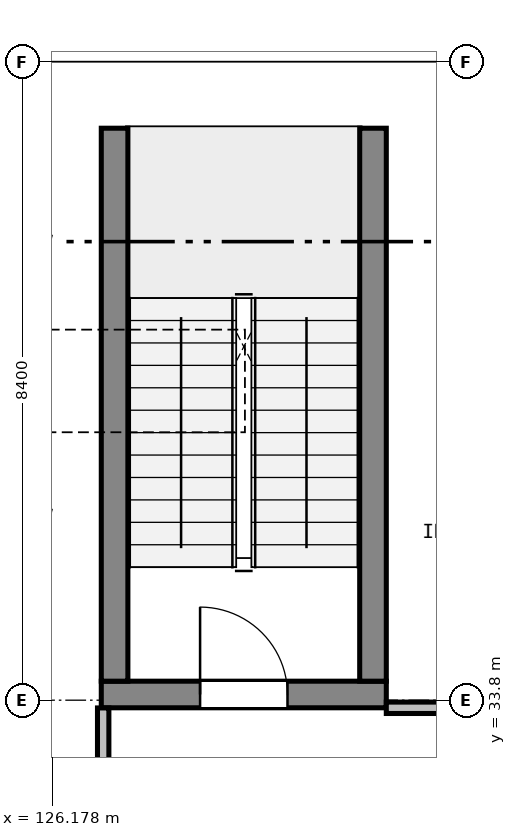
"""IFC4 building model, lengths in metres.
Left out: names, types, materials, properties, quantities, classifications, styles, units other than length and angle.
Written with IfcOpenShell. Run it as: python <this file> out.ifc"""

import sys

from ifc_helpers import new_model, si_unit, direction, frame, frame_2d, origin, place, context, subcontext, project, spatial, rectangle, extrude, element, fill, save


model = new_model("IFC4")
c1 = context("Model", 3, precision=1e-05, world=origin(), true_north=direction((0.0, 1.0)))
c2 = subcontext(c1, "Body", "Model", "MODEL_VIEW")
j1 = project(units=[si_unit("LENGTHUNIT", "METRE"), si_unit("PLANEANGLEUNIT", "RADIAN")], contexts=[c1])
p1 = place(None, origin())
s1 = spatial("IfcSite", under=j1, at=p1, CompositionType="ELEMENT")
p2 = place(p1, origin())
s2 = spatial("IfcBuilding", under=s1, at=p2, CompositionType="ELEMENT")
p3 = place(p2, frame((0.0, 0.0, 15.0)))
s3 = spatial("IfcBuildingStorey", under=s2, at=p3, CompositionType="ELEMENT", Elevation=15.0)
p4 = place(p3, frame((126.825, 33.875, 0.0), z_axis=(0.0, 0.0, 1.0), x_axis=(1.0, 0.0, 0.0)))
e1 = element("IfcWall", 1, at=p4, inside=s3, PredefinedType="SHEAR", context=c2, shape_type="SweptSolid", body=[
    extrude(rectangle(XDim=3.75, YDim=0.35, at=frame_2d((1.875, 0.0))), origin(), (0.0, 0.0, 1.0), 4.5),
])
p5 = place(p4, frame((1.3, 0.0, 0.0)))
e2 = element("IfcOpeningElement", 2, at=p5, cuts=e1, PredefinedType="OPENING", context=c2, shape_type="SweptSolid", body=[
    extrude(rectangle(XDim=1.15, YDim=2.15, at=frame_2d((0.575, 1.075))), frame((0.0, 0.185, 0.0), z_axis=(0.0, -1.0, 0.0), x_axis=(1.0, 0.0, 0.0)), (0.0, 0.0, 1.0), 0.37),
])
p6 = place(p3, frame((126.825, 41.5, 0.0), z_axis=(0.0, 0.0, 1.0), x_axis=(1.0, 0.0, 0.0)))
e3 = element("IfcWall", 3, at=p6, inside=s3, PredefinedType="SHEAR", context=c2, shape_type="SweptSolid", body=[
    extrude(rectangle(XDim=3.75, YDim=0.35, at=frame_2d((1.875, 0.0))), origin(), (0.0, 0.0, 1.0), 4.5),
])
for number, where, z_axis, x_axis in (
    (4, (127.0, 34.05, 0.0), (0.0, 0.0, 1.0), (0.0, 1.0, 0.0)),
    (5, (130.4, 34.05, 0.0), (0.0, 0.0, 1.0), (0.0, 1.0, 0.0)),
):
    element("IfcWall", number, at=place(p3, frame(where, z_axis=z_axis, x_axis=x_axis)), inside=s3, PredefinedType="SHEAR", context=c2, shape_type="SweptSolid", body=[
        extrude(rectangle(XDim=7.275, YDim=0.35, at=frame_2d((3.637, 0.0))), origin(), (0.0, 0.0, 1.0), 4.5),
    ])
p7 = place(p3, frame((130.575, 33.7, 0.0), z_axis=(0.0, 0.0, 1.0), x_axis=(1.0, 0.0, 0.0)))
e6 = element("IfcWall", 6, at=p7, inside=s3, PredefinedType="PARTITIONING", context=c2, shape_type="SweptSolid", body=[
    extrude(rectangle(XDim=1.3, YDim=0.15, at=frame_2d((0.65, 0.0))), origin(), (0.0, 0.0, 1.0), 3.835),
])
p8 = place(p3, frame((126.85, 30.1, 0.0), z_axis=(0.0, 0.0, 1.0), x_axis=(0.0, 1.0, 0.0)))
e7 = element("IfcWall", 7, at=p8, inside=s3, PredefinedType="PARTITIONING", context=c2, shape_type="SweptSolid", body=[
    extrude(rectangle(XDim=3.598, YDim=0.15, at=frame_2d((1.799, 0.0))), origin(), (0.0, 0.0, 1.0), 3.835),
])
p9 = place(p5, origin())
e8 = element("IfcDoor", 8, at=p9, inside=s3, OperationType="SINGLE_SWING_LEFT", PredefinedType="DOOR", context=c2, shape_type="SweptSolid", body=[
    extrude(rectangle(XDim=1.15, YDim=2.15, at=frame_2d((0.575, 1.075))), frame((0.0, 0.025, 0.0), z_axis=(0.0, -1.0, 0.0), x_axis=(1.0, 0.0, 0.0)), (0.0, 0.0, 1.0), 0.05),
])
fill(e2, e8)
save(model, sys.argv[1])
